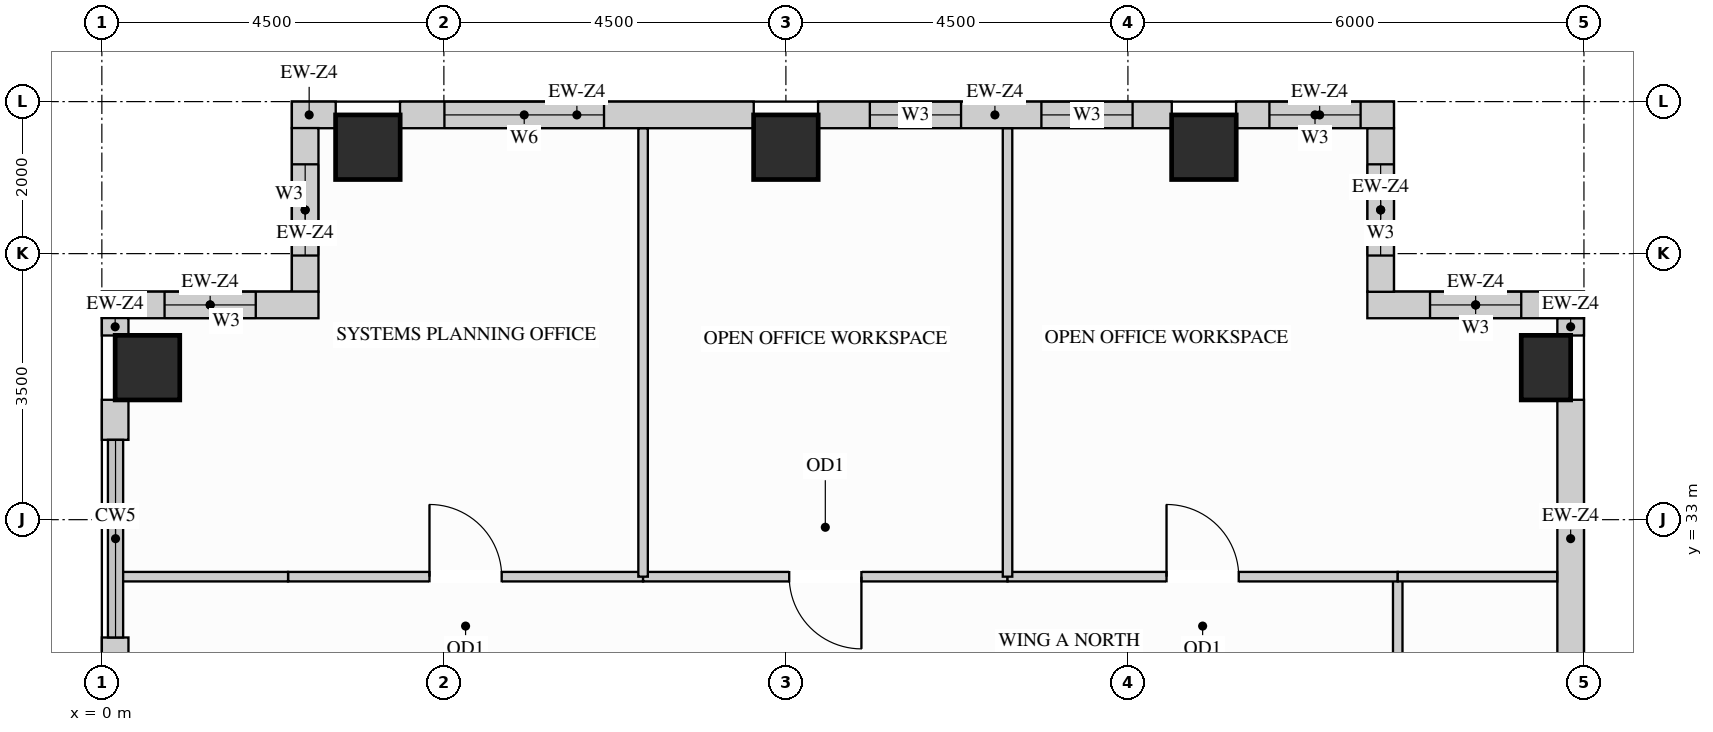
"""IFC4 building model, lengths in metres.
Left out: names, types, materials, properties, quantities, classifications, styles, units other than length and angle.
Written with IfcOpenShell. Run it as: python <this file> out.ifc"""

import sys

from ifc_helpers import new_model, si_unit, direction, frame, frame_2d, origin, origin_2d, place, context, subcontext, project, spatial, rectangle, extrude, source, transform, mapped, element, fill, save


model = new_model("IFC4")
c1 = context("Model", 3, precision=1e-05, world=origin(), true_north=direction((0.0, 1.0)))
c2 = subcontext(c1, "Body", "Model", "MODEL_VIEW")
j1 = project(units=[si_unit("LENGTHUNIT", "METRE"), si_unit("PLANEANGLEUNIT", "RADIAN")], contexts=[c1])
p1 = place(None, origin())
s1 = spatial("IfcSite", under=j1, at=p1, CompositionType="ELEMENT")
p2 = place(p1, origin())
s2 = spatial("IfcBuilding", under=s1, at=p2, CompositionType="ELEMENT")
p3 = place(p2, frame((0.0, 0.0, 259.2)))
s3 = spatial("IfcBuildingStorey", under=s2, at=p3, CompositionType="ELEMENT", Elevation=259.2)
m1 = source(origin(), c2, "Body", "SweptSolid", [
    extrude(rectangle(XDim=0.65, YDim=0.85, at=origin_2d()), origin(), (0.0, 0.0, 1.0), 3.4),
])
p4 = place(p3, frame((19.0, 35.0, 0.0), z_axis=(0.0, 0.0, 1.0), x_axis=(1.0, 0.0, 0.0)))
e1 = element("IfcColumn", 1, at=p4, inside=s3, PredefinedType="COLUMN", context=c2, shape_type="MappedRepresentation", body=[
    mapped(m1, transform((0.0, 0.0, 0.0), x_axis=(1.0, 0.0, 0.0), y_axis=(0.0, 1.0, 0.0), z_axis=(0.0, 0.0, 1.0))),
])
m2 = source(origin(), c2, "Body", "SweptSolid", [
    extrude(rectangle(XDim=0.85, YDim=0.85, at=origin_2d()), origin(), (0.0, 0.0, 1.0), 3.4),
])
for number, where, z_axis, x_axis in (
    (2, (14.5, 37.9, 0.0), (0.0, 0.0, 1.0), (1.0, 0.0, 0.0)),
    (3, (3.5, 37.9, 0.0), (0.0, 0.0, 1.0), (1.0, 0.0, 0.0)),
    (4, (9.0, 37.9, 0.0), (0.0, 0.0, 1.0), (1.0, 0.0, 0.0)),
    (5, (0.6, 35.0, 0.0), (0.0, 0.0, 1.0), (1.0, 0.0, 0.0)),
):
    element("IfcColumn", number, at=place(p3, frame(where, z_axis=z_axis, x_axis=x_axis)), inside=s3, PredefinedType="COLUMN", context=c2, shape_type="MappedRepresentation", body=[
        mapped(m2, transform((0.0, 0.0, 0.0), x_axis=(1.0, 0.0, 0.0), y_axis=(0.0, 1.0, 0.0), z_axis=(0.0, 0.0, 1.0))),
    ])
m3 = source(origin(), c2, "Body", "SweptSolid", [
    extrude(rectangle(XDim=3.654, YDim=0.35, at=frame_2d((1.827, 0.0))), origin(), (0.0, 0.0, 1.0), 2.619),
])
p5 = place(p3, frame((19.325, 30.923, 0.0), z_axis=(0.0, 0.0, 1.0), x_axis=(0.0, 1.0, 0.0)))
e6 = element("IfcWall", 6, at=p5, inside=s3, PredefinedType="SOLIDWALL", context=c2, shape_type="MappedRepresentation", body=[
    mapped(m3, transform((0.0, 0.0, 0.0), x_axis=(1.0, 0.0, 0.0), y_axis=(0.0, 1.0, 0.0), z_axis=(0.0, 0.0, 1.0))),
])
m4 = source(origin(), c2, "Body", "SweptSolid", [
    extrude(rectangle(XDim=0.229, YDim=0.35, at=frame_2d((0.115, 0.0))), origin(), (0.0, 0.0, 1.0), 3.385),
])
p6 = place(p3, frame((19.325, 35.423, 0.0), z_axis=(0.0, 0.0, 1.0), x_axis=(0.0, 1.0, 0.0)))
e7 = element("IfcWall", 7, at=p6, inside=s3, PredefinedType="SOLIDWALL", context=c2, shape_type="MappedRepresentation", body=[
    mapped(m4, transform((0.0, 0.0, 0.0), x_axis=(1.0, 0.0, 0.0), y_axis=(0.0, 1.0, 0.0), z_axis=(0.0, 0.0, 1.0))),
])
p7 = place(p3, frame((19.5, 35.825, 0.0), z_axis=(0.0, 0.0, 1.0), x_axis=(-1.0, 0.0, 0.0)))
e8 = element("IfcWall", 8, at=p7, inside=s3, PredefinedType="SOLIDWALL", context=c2, shape_type="SweptSolid", body=[
    extrude(rectangle(XDim=2.85, YDim=0.35, at=frame_2d((1.425, 0.0))), origin(), (0.0, 0.0, 1.0), 3.385),
])
p8 = place(p7, frame((0.825, 0.0, 0.78)))
e9 = element("IfcOpeningElement", 9, at=p8, cuts=e8, PredefinedType="OPENING", context=c2, shape_type="SweptSolid", body=[
    extrude(rectangle(XDim=1.2, YDim=2.25, at=frame_2d((0.6, 1.125))), frame((0.0, 0.185, 0.0), z_axis=(0.0, -1.0, 0.0), x_axis=(1.0, 0.0, 0.0)), (0.0, 0.0, 1.0), 0.37),
])
p9 = place(p3, frame((16.825, 35.998, 0.0), z_axis=(0.0, 0.0, 1.0), x_axis=(0.0, 1.0, 0.0)))
e10 = element("IfcWall", 10, at=p9, inside=s3, PredefinedType="SOLIDWALL", context=c2, shape_type="SweptSolid", body=[
    extrude(rectangle(XDim=2.154, YDim=0.35, at=frame_2d((1.077, 0.0))), origin(), (0.0, 0.0, 1.0), 3.385),
])
p10 = place(p9, frame((0.477, 0.0, 0.78)))
e11 = element("IfcOpeningElement", 11, at=p10, cuts=e10, PredefinedType="OPENING", context=c2, shape_type="SweptSolid", body=[
    extrude(rectangle(XDim=1.2, YDim=2.25, at=frame_2d((0.6, 1.125))), frame((0.0, 0.185, 0.0), z_axis=(0.0, -1.0, 0.0), x_axis=(1.0, 0.0, 0.0)), (0.0, 0.0, 1.0), 0.37),
])
p11 = place(p3, frame((17.0, 38.325, 0.0), z_axis=(0.0, 0.0, 1.0), x_axis=(-1.0, 0.0, 0.0)))
e12 = element("IfcWall", 12, at=p11, inside=s3, PredefinedType="SOLIDWALL", context=c2, shape_type="SweptSolid", body=[
    extrude(rectangle(XDim=2.077, YDim=0.35, at=frame_2d((1.039, 0.0))), origin(), (0.0, 0.0, 1.0), 3.385),
])
p12 = place(p11, frame((0.438, 0.0, 0.78)))
e13 = element("IfcOpeningElement", 13, at=p12, cuts=e12, PredefinedType="OPENING", context=c2, shape_type="SweptSolid", body=[
    extrude(rectangle(XDim=1.2, YDim=2.25, at=frame_2d((0.6, 1.125))), frame((0.0, 0.185, 0.0), z_axis=(0.0, -1.0, 0.0), x_axis=(1.0, 0.0, 0.0)), (0.0, 0.0, 1.0), 0.37),
])
p13 = place(p3, frame((14.077, 38.325, 0.0), z_axis=(0.0, 0.0, 1.0), x_axis=(-1.0, 0.0, 0.0)))
e14 = element("IfcWall", 14, at=p13, inside=s3, PredefinedType="SOLIDWALL", context=c2, shape_type="SweptSolid", body=[
    extrude(rectangle(XDim=4.654, YDim=0.35, at=frame_2d((2.327, 0.0))), origin(), (0.0, 0.0, 1.0), 3.385),
])
p14 = place(p13, frame((0.515, 0.0, 0.78)))
e15 = element("IfcOpeningElement", 15, at=p14, cuts=e14, PredefinedType="OPENING", context=c2, shape_type="SweptSolid", body=[
    extrude(rectangle(XDim=1.2, YDim=2.25, at=frame_2d((0.6, 1.125))), frame((0.0, 0.185, 0.0), z_axis=(0.0, -1.0, 0.0), x_axis=(1.0, 0.0, 0.0)), (0.0, 0.0, 1.0), 0.37),
])
p15 = place(p13, frame((2.772, 0.0, 0.78)))
e16 = element("IfcOpeningElement", 16, at=p15, cuts=e14, PredefinedType="OPENING", context=c2, shape_type="SweptSolid", body=[
    extrude(rectangle(XDim=1.2, YDim=2.25, at=frame_2d((0.6, 1.125))), frame((0.0, 0.185, 0.0), z_axis=(0.0, -1.0, 0.0), x_axis=(1.0, 0.0, 0.0)), (0.0, 0.0, 1.0), 0.37),
])
p16 = place(p3, frame((8.577, 38.325, 0.0), z_axis=(0.0, 0.0, 1.0), x_axis=(-1.0, 0.0, 0.0)))
e17 = element("IfcWall", 17, at=p16, inside=s3, PredefinedType="SOLIDWALL", context=c2, shape_type="SweptSolid", body=[
    extrude(rectangle(XDim=4.654, YDim=0.35, at=frame_2d((2.327, 0.0))), origin(), (0.0, 0.0, 1.0), 3.385),
])
p17 = place(p16, frame((1.97, 0.0, 0.78)))
e18 = element("IfcOpeningElement", 18, at=p17, cuts=e17, PredefinedType="OPENING", context=c2, shape_type="SweptSolid", body=[
    extrude(rectangle(XDim=2.1, YDim=2.25, at=frame_2d((1.05, 1.125))), frame((0.0, 0.185, 0.0), z_axis=(0.0, -1.0, 0.0), x_axis=(1.0, 0.0, 0.0)), (0.0, 0.0, 1.0), 0.37),
])
m5 = source(origin(), c2, "Body", "SweptSolid", [
    extrude(rectangle(XDim=0.577, YDim=0.35, at=frame_2d((0.289, 0.0))), origin(), (0.0, 0.0, 1.0), 3.385),
])
p18 = place(p3, frame((3.077, 38.325, 0.0), z_axis=(0.0, 0.0, 1.0), x_axis=(-1.0, 0.0, 0.0)))
e19 = element("IfcWall", 19, at=p18, inside=s3, PredefinedType="SOLIDWALL", context=c2, shape_type="MappedRepresentation", body=[
    mapped(m5, transform((0.0, 0.0, 0.0), x_axis=(1.0, 0.0, 0.0), y_axis=(0.0, 1.0, 0.0), z_axis=(0.0, 0.0, 1.0))),
])
p19 = place(p3, frame((2.675, 38.152, 0.0), z_axis=(0.0, 0.0, 1.0), x_axis=(0.0, -1.0, 0.0)))
e20 = element("IfcWall", 20, at=p19, inside=s3, PredefinedType="SOLIDWALL", context=c2, shape_type="SweptSolid", body=[
    extrude(rectangle(XDim=2.154, YDim=0.35, at=frame_2d((1.077, 0.0))), origin(), (0.0, 0.0, 1.0), 3.385),
])
p20 = place(p19, frame((0.477, 0.0, 0.78)))
e21 = element("IfcOpeningElement", 21, at=p20, cuts=e20, PredefinedType="OPENING", context=c2, shape_type="SweptSolid", body=[
    extrude(rectangle(XDim=1.2, YDim=2.25, at=frame_2d((0.6, 1.125))), frame((0.0, 0.185, 0.0), z_axis=(0.0, -1.0, 0.0), x_axis=(1.0, 0.0, 0.0)), (0.0, 0.0, 1.0), 0.37),
])
p21 = place(p3, frame((2.85, 35.825, 0.0), z_axis=(0.0, 0.0, 1.0), x_axis=(-1.0, 0.0, 0.0)))
e22 = element("IfcWall", 22, at=p21, inside=s3, PredefinedType="SOLIDWALL", context=c2, shape_type="SweptSolid", body=[
    extrude(rectangle(XDim=2.85, YDim=0.35, at=frame_2d((1.425, 0.0))), origin(), (0.0, 0.0, 1.0), 3.385),
])
p22 = place(p21, frame((0.825, 0.0, 0.78)))
e23 = element("IfcOpeningElement", 23, at=p22, cuts=e22, PredefinedType="OPENING", context=c2, shape_type="SweptSolid", body=[
    extrude(rectangle(XDim=1.2, YDim=2.25, at=frame_2d((0.6, 1.125))), frame((0.0, 0.185, 0.0), z_axis=(0.0, -1.0, 0.0), x_axis=(1.0, 0.0, 0.0)), (0.0, 0.0, 1.0), 0.37),
])
p23 = place(p3, frame((0.175, 35.652, 0.0), z_axis=(0.0, 0.0, 1.0), x_axis=(0.0, -1.0, 0.0)))
e24 = element("IfcWall", 24, at=p23, inside=s3, PredefinedType="SOLIDWALL", context=c2, shape_type="MappedRepresentation", body=[
    mapped(m4, transform((0.0, 0.0, 0.0), x_axis=(1.0, 0.0, 0.0), y_axis=(0.0, 1.0, 0.0), z_axis=(0.0, 0.0, 1.0))),
])
m6 = source(origin(), c2, "Body", "SweptSolid", [
    extrude(rectangle(XDim=0.527, YDim=0.35, at=frame_2d((0.263, 0.0))), origin(), (0.0, 0.0, 1.0), 3.385),
])
for number, where, z_axis, x_axis in (
    (25, (0.175, 34.577, 0.0), (0.0, 0.0, 1.0), (0.0, -1.0, 0.0)),
    (26, (0.175, 31.45, 0.0), (0.0, 0.0, 1.0), (0.0, -1.0, 0.0)),
):
    element("IfcWall", number, at=place(p3, frame(where, z_axis=z_axis, x_axis=x_axis)), inside=s3, PredefinedType="SOLIDWALL", context=c2, shape_type="MappedRepresentation", body=[
        mapped(m6, transform((0.0, 0.0, 0.0), x_axis=(1.0, 0.0, 0.0), y_axis=(0.0, 1.0, 0.0), z_axis=(0.0, 0.0, 1.0))),
    ])
p24 = place(p3, frame((17.05, 26.05, 0.0), z_axis=(0.0, 0.0, 1.0), x_axis=(0.0, 1.0, 0.0)))
e27 = element("IfcWall", 27, at=p24, inside=s3, PredefinedType="PARTITIONING", context=c2, shape_type="SweptSolid", body=[
    extrude(rectangle(XDim=6.2, YDim=0.125, at=frame_2d((3.1, 0.0))), origin(), (0.0, 0.0, 1.0), 3.385),
])
p25 = place(p24, frame((2.625, 0.0, 0.0)))
e28 = element("IfcOpeningElement", 28, at=p25, cuts=e27, PredefinedType="OPENING", context=c2, shape_type="SweptSolid", body=[
    extrude(rectangle(XDim=0.95, YDim=2.15, at=frame_2d((0.475, 1.075))), frame((0.0, 0.073, 0.0), z_axis=(0.0, -1.0, 0.0), x_axis=(1.0, 0.0, 0.0)), (0.0, 0.0, 1.0), 0.145),
])
p26 = place(p3, frame((2.45, 32.25, 0.0), z_axis=(0.0, 0.0, 1.0), x_axis=(1.0, 0.0, 0.0)))
e29 = element("IfcWall", 29, at=p26, inside=s3, PredefinedType="PARTITIONING", context=c2, shape_type="SweptSolid", body=[
    extrude(rectangle(XDim=4.671, YDim=0.125, at=frame_2d((2.335, 0.0))), origin(), (0.0, 0.0, 1.0), 3.385),
])
p27 = place(p26, frame((1.861, 0.0, 0.0)))
e30 = element("IfcOpeningElement", 30, at=p27, cuts=e29, PredefinedType="OPENING", context=c2, shape_type="SweptSolid", body=[
    extrude(rectangle(XDim=0.95, YDim=2.15, at=frame_2d((0.475, 1.075))), frame((0.0, 0.073, 0.0), z_axis=(0.0, -1.0, 0.0), x_axis=(1.0, 0.0, 0.0)), (0.0, 0.0, 1.0), 0.145),
])
p28 = place(p3, frame((7.121, 32.25, 0.0), z_axis=(0.0, 0.0, 1.0), x_axis=(1.0, 0.0, 0.0)))
e31 = element("IfcWall", 31, at=p28, inside=s3, PredefinedType="PARTITIONING", context=c2, shape_type="SweptSolid", body=[
    extrude(rectangle(XDim=4.795, YDim=0.125, at=frame_2d((2.397, 0.0))), origin(), (0.0, 0.0, 1.0), 3.385),
])
p29 = place(p28, frame((1.923, 0.0, 0.0)))
e32 = element("IfcOpeningElement", 32, at=p29, cuts=e31, PredefinedType="OPENING", context=c2, shape_type="SweptSolid", body=[
    extrude(rectangle(XDim=0.95, YDim=2.15, at=frame_2d((0.475, 1.075))), frame((0.0, 0.073, 0.0), z_axis=(0.0, -1.0, 0.0), x_axis=(1.0, 0.0, 0.0)), (0.0, 0.0, 1.0), 0.145),
])
p30 = place(p3, frame((11.916, 32.25, 0.0), z_axis=(0.0, 0.0, 1.0), x_axis=(1.0, 0.0, 0.0)))
e33 = element("IfcWall", 33, at=p30, inside=s3, PredefinedType="PARTITIONING", context=c2, shape_type="SweptSolid", body=[
    extrude(rectangle(XDim=5.134, YDim=0.125, at=frame_2d((2.567, 0.0))), origin(), (0.0, 0.0, 1.0), 3.385),
])
p31 = place(p30, frame((2.092, 0.0, 0.0)))
e34 = element("IfcOpeningElement", 34, at=p31, cuts=e33, PredefinedType="OPENING", context=c2, shape_type="SweptSolid", body=[
    extrude(rectangle(XDim=0.95, YDim=2.15, at=frame_2d((0.475, 1.075))), frame((0.0, 0.073, 0.0), z_axis=(0.0, -1.0, 0.0), x_axis=(1.0, 0.0, 0.0)), (0.0, 0.0, 1.0), 0.145),
])
m7 = source(origin(), c2, "Body", "SweptSolid", [
    extrude(rectangle(XDim=2.098, YDim=0.125, at=frame_2d((1.049, 0.0))), origin(), (0.0, 0.0, 1.0), 3.385),
])
p32 = place(p3, frame((17.05, 32.25, 0.0), z_axis=(0.0, 0.0, 1.0), x_axis=(1.0, 0.0, 0.0)))
e35 = element("IfcWall", 35, at=p32, inside=s3, PredefinedType="PARTITIONING", context=c2, shape_type="MappedRepresentation", body=[
    mapped(m7, transform((0.0, 0.0, 0.0), x_axis=(1.0, 0.0, 0.0), y_axis=(0.0, 1.0, 0.0), z_axis=(0.0, 0.0, 1.0))),
])
m8 = source(origin(), c2, "Body", "SweptSolid", [
    extrude(rectangle(XDim=2.24, YDim=0.125, at=frame_2d((1.12, 0.0))), origin(), (0.0, 0.0, 1.0), 3.385),
])
p33 = place(p3, frame((0.21, 32.25, 0.0), z_axis=(0.0, 0.0, 1.0), x_axis=(1.0, 0.0, 0.0)))
e36 = element("IfcWall", 36, at=p33, inside=s3, PredefinedType="PARTITIONING", context=c2, shape_type="MappedRepresentation", body=[
    mapped(m8, transform((0.0, 0.0, 0.0), x_axis=(1.0, 0.0, 0.0), y_axis=(0.0, 1.0, 0.0), z_axis=(0.0, 0.0, 1.0))),
])
m9 = source(origin(), c2, "Body", "SweptSolid", [
    extrude(rectangle(XDim=5.898, YDim=0.125, at=frame_2d((2.949, 0.0))), origin(), (0.0, 0.0, 1.0), 3.385),
])
for number, where, z_axis, x_axis in (
    (37, (7.121, 32.25, 0.0), (0.0, 0.0, 1.0), (0.0, 1.0, 0.0)),
    (38, (11.916, 32.25, 0.0), (0.0, 0.0, 1.0), (0.0, 1.0, 0.0)),
):
    element("IfcWall", number, at=place(p3, frame(where, z_axis=z_axis, x_axis=x_axis)), inside=s3, PredefinedType="PARTITIONING", context=c2, shape_type="MappedRepresentation", body=[
        mapped(m9, transform((0.0, 0.0, 0.0), x_axis=(1.0, 0.0, 0.0), y_axis=(0.0, 1.0, 0.0), z_axis=(0.0, 0.0, 1.0))),
    ])
m10 = source(origin(), c2, "Body", "SweptSolid", [
    extrude(rectangle(XDim=0.95, YDim=2.15, at=frame_2d((0.475, 1.075))), frame((0.0, 0.025, 0.0), z_axis=(0.0, -1.0, 0.0), x_axis=(1.0, 0.0, 0.0)), (0.0, 0.0, 1.0), 0.05),
])
p34 = place(p27, origin())
e39 = element("IfcDoor", 39, at=p34, inside=s3, OperationType="SINGLE_SWING_LEFT", PredefinedType="DOOR", context=c2, shape_type="MappedRepresentation", body=[
    mapped(m10, transform((0.0, 0.0, 0.0), x_axis=(1.0, 0.0, 0.0), y_axis=(0.0, 1.0, 0.0), z_axis=(0.0, 0.0, 1.0))),
])
fill(e30, e39)
p35 = place(p29, origin())
e40 = element("IfcDoor", 40, at=p35, inside=s3, OperationType="SINGLE_SWING_RIGHT", PredefinedType="DOOR", context=c2, shape_type="MappedRepresentation", body=[
    mapped(m10, transform((0.0, 0.0, 0.0), x_axis=(1.0, 0.0, 0.0), y_axis=(0.0, 1.0, 0.0), z_axis=(0.0, 0.0, 1.0))),
])
fill(e32, e40)
p36 = place(p31, origin())
e41 = element("IfcDoor", 41, at=p36, inside=s3, OperationType="SINGLE_SWING_LEFT", PredefinedType="DOOR", context=c2, shape_type="MappedRepresentation", body=[
    mapped(m10, transform((0.0, 0.0, 0.0), x_axis=(1.0, 0.0, 0.0), y_axis=(0.0, 1.0, 0.0), z_axis=(0.0, 0.0, 1.0))),
])
fill(e34, e41)
m11 = source(origin(), c2, "Body", "SweptSolid", [
    extrude(rectangle(XDim=1.2, YDim=2.25, at=frame_2d((0.6, 1.125))), frame((0.0, 0.03, 0.0), z_axis=(0.0, -1.0, 0.0), x_axis=(1.0, 0.0, 0.0)), (0.0, 0.0, 1.0), 0.06),
])
p37 = place(p8, origin())
e42 = element("IfcWindow", 42, at=p37, inside=s3, PartitioningType="SINGLE_PANEL", PredefinedType="WINDOW", context=c2, shape_type="MappedRepresentation", body=[
    mapped(m11, transform((0.0, 0.0, 0.0), x_axis=(1.0, 0.0, 0.0), y_axis=(0.0, 1.0, 0.0), z_axis=(0.0, 0.0, 1.0))),
])
fill(e9, e42)
p38 = place(p10, origin())
e43 = element("IfcWindow", 43, at=p38, inside=s3, PartitioningType="SINGLE_PANEL", PredefinedType="WINDOW", context=c2, shape_type="MappedRepresentation", body=[
    mapped(m11, transform((0.0, 0.0, 0.0), x_axis=(1.0, 0.0, 0.0), y_axis=(0.0, 1.0, 0.0), z_axis=(0.0, 0.0, 1.0))),
])
fill(e11, e43)
p39 = place(p12, origin())
e44 = element("IfcWindow", 44, at=p39, inside=s3, PartitioningType="SINGLE_PANEL", PredefinedType="WINDOW", context=c2, shape_type="MappedRepresentation", body=[
    mapped(m11, transform((0.0, 0.0, 0.0), x_axis=(1.0, 0.0, 0.0), y_axis=(0.0, 1.0, 0.0), z_axis=(0.0, 0.0, 1.0))),
])
fill(e13, e44)
p40 = place(p14, origin())
e45 = element("IfcWindow", 45, at=p40, inside=s3, PartitioningType="SINGLE_PANEL", PredefinedType="WINDOW", context=c2, shape_type="MappedRepresentation", body=[
    mapped(m11, transform((0.0, 0.0, 0.0), x_axis=(1.0, 0.0, 0.0), y_axis=(0.0, 1.0, 0.0), z_axis=(0.0, 0.0, 1.0))),
])
fill(e15, e45)
p41 = place(p15, origin())
e46 = element("IfcWindow", 46, at=p41, inside=s3, PartitioningType="SINGLE_PANEL", PredefinedType="WINDOW", context=c2, shape_type="MappedRepresentation", body=[
    mapped(m11, transform((0.0, 0.0, 0.0), x_axis=(1.0, 0.0, 0.0), y_axis=(0.0, 1.0, 0.0), z_axis=(0.0, 0.0, 1.0))),
])
fill(e16, e46)
p42 = place(p20, origin())
e47 = element("IfcWindow", 47, at=p42, inside=s3, PartitioningType="SINGLE_PANEL", PredefinedType="WINDOW", context=c2, shape_type="MappedRepresentation", body=[
    mapped(m11, transform((0.0, 0.0, 0.0), x_axis=(1.0, 0.0, 0.0), y_axis=(0.0, 1.0, 0.0), z_axis=(0.0, 0.0, 1.0))),
])
fill(e21, e47)
p43 = place(p22, origin())
e48 = element("IfcWindow", 48, at=p43, inside=s3, PartitioningType="SINGLE_PANEL", PredefinedType="WINDOW", context=c2, shape_type="MappedRepresentation", body=[
    mapped(m11, transform((0.0, 0.0, 0.0), x_axis=(1.0, 0.0, 0.0), y_axis=(0.0, 1.0, 0.0), z_axis=(0.0, 0.0, 1.0))),
])
fill(e23, e48)
m12 = source(origin(), c2, "Body", "SweptSolid", [
    extrude(rectangle(XDim=2.1, YDim=2.25, at=frame_2d((1.05, 1.125))), frame((0.0, 0.03, 0.0), z_axis=(0.0, -1.0, 0.0), x_axis=(1.0, 0.0, 0.0)), (0.0, 0.0, 1.0), 0.06),
])
p44 = place(p17, origin())
e49 = element("IfcWindow", 49, at=p44, inside=s3, PartitioningType="SINGLE_PANEL", PredefinedType="WINDOW", context=c2, shape_type="MappedRepresentation", body=[
    mapped(m12, transform((0.0, 0.0, 0.0), x_axis=(1.0, 0.0, 0.0), y_axis=(0.0, 1.0, 0.0), z_axis=(0.0, 0.0, 1.0))),
])
fill(e18, e49)
save(model, sys.argv[1])
